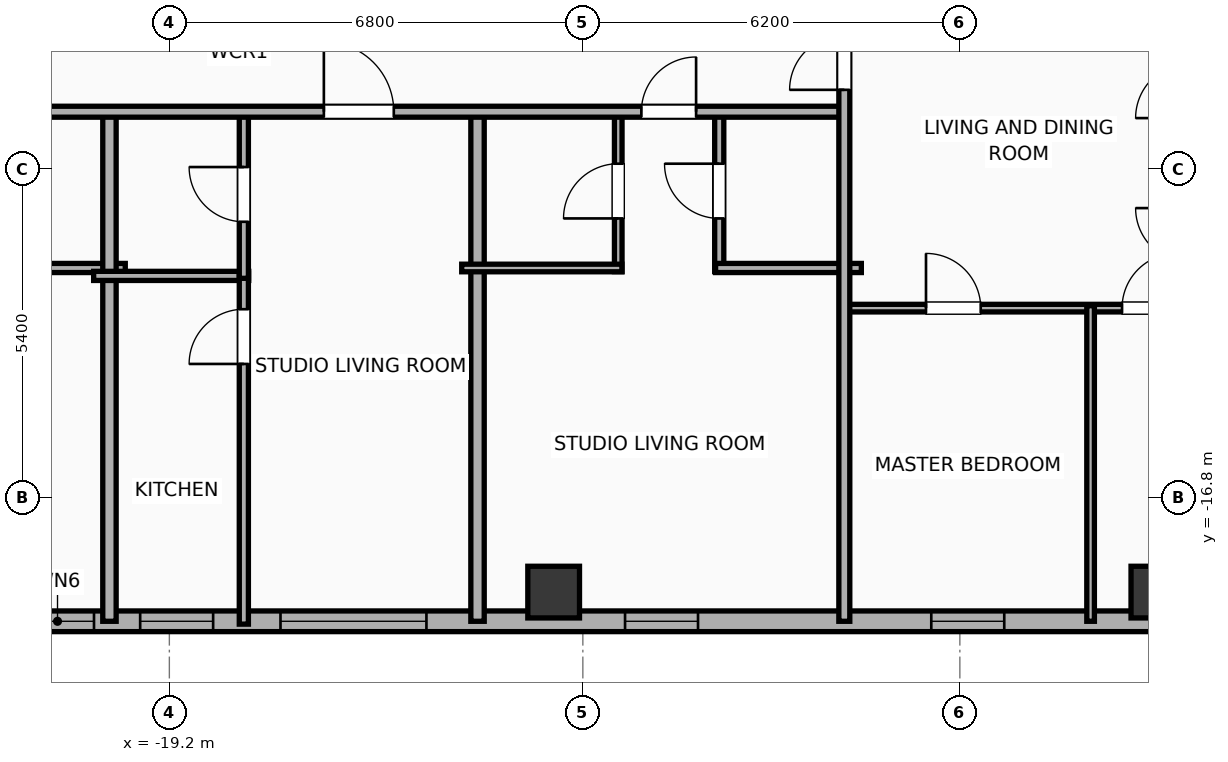
"""IFC4 building model, lengths in metres.
Left out: names, types, materials, properties, quantities, classifications, styles, units other than length and angle.
Written with IfcOpenShell. Run it as: python <this file> out.ifc"""

import sys

from ifc_helpers import new_model, si_unit, direction, frame, frame_2d, origin, origin_2d, place, context, subcontext, project, spatial, rectangle, hollow_rectangle, extrude, element, fill, save


model = new_model("IFC4")
c1 = context("Model", 3, precision=1e-05, world=origin(), true_north=direction((0.0, 1.0)))
c2 = subcontext(c1, "Body", "Model", "MODEL_VIEW")
j1 = project(units=[si_unit("LENGTHUNIT", "METRE"), si_unit("PLANEANGLEUNIT", "RADIAN")], contexts=[c1])
p1 = place(None, origin())
s1 = spatial("IfcSite", under=j1, at=p1, CompositionType="ELEMENT")
p2 = place(p1, origin())
s2 = spatial("IfcBuilding", under=s1, at=p2, CompositionType="ELEMENT")
p3 = place(p2, frame((0.0, 0.0, 239.2)))
s3 = spatial("IfcBuildingStorey", under=s2, at=p3, CompositionType="ELEMENT", Elevation=239.2)
for number, where, z_axis, x_axis in (
    (1, (-12.88, -18.35, 0.0), (0.0, 0.0, 1.0), (1.0, 0.0, 0.0)),
    (2, (-2.96, -18.35, 0.0), (0.0, 0.0, 1.0), (1.0, 0.0, 0.0)),
):
    element("IfcColumn", number, at=place(p3, frame(where, z_axis=z_axis, x_axis=x_axis)), inside=s3, PredefinedType="COLUMN", context=c2, shape_type="SweptSolid", body=[
        extrude(hollow_rectangle(XDim=0.85, YDim=0.85, WallThickness=0.028, at=origin_2d()), origin(), (0.0, 0.0, 1.0), 3.9),
    ])
p4 = place(p3, frame((26.783, -18.83, 0.0), z_axis=(0.0, 0.0, 1.0), x_axis=(-1.0, 0.0, 0.0)))
e3 = element("IfcWall", 3, at=p4, inside=s3, PredefinedType="ELEMENTEDWALL", context=c2, shape_type="SweptSolid", body=[
    extrude(rectangle(XDim=49.566, YDim=0.34, at=frame_2d((24.783, 0.0))), origin(), (0.0, 0.0, 1.0), 3.65),
])
p5 = place(p4, frame((23.583, 0.0, 0.75)))
e4 = element("IfcOpeningElement", 4, at=p5, cuts=e3, PredefinedType="OPENING", context=c2, shape_type="SweptSolid", body=[
    extrude(rectangle(XDim=2.4, YDim=2.1, at=frame_2d((1.2, 1.05))), frame((0.0, 0.18, 0.0), z_axis=(0.0, -1.0, 0.0), x_axis=(1.0, 0.0, 0.0)), (0.0, 0.0, 1.0), 0.36),
])
p6 = place(p4, frame((41.756, 0.0, 0.75)))
e5 = element("IfcOpeningElement", 5, at=p6, cuts=e3, PredefinedType="OPENING", context=c2, shape_type="SweptSolid", body=[
    extrude(rectangle(XDim=2.4, YDim=2.1, at=frame_2d((1.2, 1.05))), frame((0.0, 0.18, 0.0), z_axis=(0.0, -1.0, 0.0), x_axis=(1.0, 0.0, 0.0)), (0.0, 0.0, 1.0), 0.36),
])
p7 = place(p4, frame((47.222, 0.0, 0.75)))
e6 = element("IfcOpeningElement", 6, at=p7, cuts=e3, PredefinedType="OPENING", context=c2, shape_type="SweptSolid", body=[
    extrude(rectangle(XDim=1.2, YDim=2.05, at=frame_2d((0.6, 1.025))), frame((0.0, 0.18, 0.0), z_axis=(0.0, -1.0, 0.0), x_axis=(1.0, 0.0, 0.0)), (0.0, 0.0, 1.0), 0.36),
])
p8 = place(p4, frame((45.263, 0.0, 0.75)))
e7 = element("IfcOpeningElement", 7, at=p8, cuts=e3, PredefinedType="OPENING", context=c2, shape_type="SweptSolid", body=[
    extrude(rectangle(XDim=1.2, YDim=2.05, at=frame_2d((0.6, 1.025))), frame((0.0, 0.18, 0.0), z_axis=(0.0, -1.0, 0.0), x_axis=(1.0, 0.0, 0.0)), (0.0, 0.0, 1.0), 0.36),
])
p9 = place(p4, frame((37.289, 0.0, 0.75)))
e8 = element("IfcOpeningElement", 8, at=p9, cuts=e3, PredefinedType="OPENING", context=c2, shape_type="SweptSolid", body=[
    extrude(rectangle(XDim=1.2, YDim=2.05, at=frame_2d((0.6, 1.025))), frame((0.0, 0.18, 0.0), z_axis=(0.0, -1.0, 0.0), x_axis=(1.0, 0.0, 0.0)), (0.0, 0.0, 1.0), 0.36),
])
p10 = place(p4, frame((16.115, 0.0, 0.75)))
e9 = element("IfcOpeningElement", 9, at=p10, cuts=e3, PredefinedType="OPENING", context=c2, shape_type="SweptSolid", body=[
    extrude(rectangle(XDim=1.2, YDim=2.05, at=frame_2d((0.6, 1.025))), frame((0.0, 0.18, 0.0), z_axis=(0.0, -1.0, 0.0), x_axis=(1.0, 0.0, 0.0)), (0.0, 0.0, 1.0), 0.36),
])
p11 = place(p4, frame((12.422, 0.0, 0.75)))
e10 = element("IfcOpeningElement", 10, at=p11, cuts=e3, PredefinedType="OPENING", context=c2, shape_type="SweptSolid", body=[
    extrude(rectangle(XDim=1.2, YDim=2.05, at=frame_2d((0.6, 1.025))), frame((0.0, 0.18, 0.0), z_axis=(0.0, -1.0, 0.0), x_axis=(1.0, 0.0, 0.0)), (0.0, 0.0, 1.0), 0.36),
])
p12 = place(p4, frame((8.01, 0.0, 0.75)))
e11 = element("IfcOpeningElement", 11, at=p12, cuts=e3, PredefinedType="OPENING", context=c2, shape_type="SweptSolid", body=[
    extrude(rectangle(XDim=1.2, YDim=2.05, at=frame_2d((0.6, 1.025))), frame((0.0, 0.18, 0.0), z_axis=(0.0, -1.0, 0.0), x_axis=(1.0, 0.0, 0.0)), (0.0, 0.0, 1.0), 0.36),
])
p13 = place(p4, frame((5.037, 0.0, 0.75)))
e12 = element("IfcOpeningElement", 12, at=p13, cuts=e3, PredefinedType="OPENING", context=c2, shape_type="SweptSolid", body=[
    extrude(rectangle(XDim=1.2, YDim=2.05, at=frame_2d((0.6, 1.025))), frame((0.0, 0.18, 0.0), z_axis=(0.0, -1.0, 0.0), x_axis=(1.0, 0.0, 0.0)), (0.0, 0.0, 1.0), 0.36),
])
p14 = place(p4, frame((1.811, 0.0, 0.75)))
e13 = element("IfcOpeningElement", 13, at=p14, cuts=e3, PredefinedType="OPENING", context=c2, shape_type="SweptSolid", body=[
    extrude(rectangle(XDim=1.2, YDim=2.05, at=frame_2d((0.6, 1.025))), frame((0.0, 0.18, 0.0), z_axis=(0.0, -1.0, 0.0), x_axis=(1.0, 0.0, 0.0)), (0.0, 0.0, 1.0), 0.36),
])
p15 = place(p4, frame((32.253, 0.0, 0.75)))
e14 = element("IfcOpeningElement", 14, at=p15, cuts=e3, PredefinedType="OPENING", context=c2, shape_type="SweptSolid", body=[
    extrude(rectangle(XDim=1.2, YDim=2.05, at=frame_2d((0.6, 1.025))), frame((0.0, 0.18, 0.0), z_axis=(0.0, -1.0, 0.0), x_axis=(1.0, 0.0, 0.0)), (0.0, 0.0, 1.0), 0.36),
])
p16 = place(p4, frame((27.853, 0.0, 0.75)))
e15 = element("IfcOpeningElement", 15, at=p16, cuts=e3, PredefinedType="OPENING", context=c2, shape_type="SweptSolid", body=[
    extrude(rectangle(XDim=1.2, YDim=2.05, at=frame_2d((0.6, 1.025))), frame((0.0, 0.18, 0.0), z_axis=(0.0, -1.0, 0.0), x_axis=(1.0, 0.0, 0.0)), (0.0, 0.0, 1.0), 0.36),
])
p17 = place(p4, frame((20.473, 0.0, 0.75)))
e16 = element("IfcOpeningElement", 16, at=p17, cuts=e3, PredefinedType="OPENING", context=c2, shape_type="SweptSolid", body=[
    extrude(rectangle(XDim=1.2, YDim=2.05, at=frame_2d((0.6, 1.025))), frame((0.0, 0.18, 0.0), z_axis=(0.0, -1.0, 0.0), x_axis=(1.0, 0.0, 0.0)), (0.0, 0.0, 1.0), 0.36),
])
p18 = place(p3, frame((-22.342, -13.02, 0.0), z_axis=(0.0, 0.0, 1.0), x_axis=(1.0, 0.0, 0.0)))
e17 = element("IfcWall", 17, at=p18, inside=s3, PredefinedType="PLUMBINGWALL", context=c2, shape_type="SweptSolid", body=[
    extrude(rectangle(XDim=2.417, YDim=0.15, at=frame_2d((1.208, 0.0))), origin(), (0.0, 0.0, 1.0), 3.65),
])
p19 = place(p3, frame((-20.185, -18.83, 0.0), z_axis=(0.0, 0.0, 1.0), x_axis=(0.0, 1.0, 0.0)))
e18 = element("IfcWall", 18, at=p19, inside=s3, PredefinedType="PARTITIONING", context=c2, shape_type="SweptSolid", body=[
    extrude(rectangle(XDim=8.46, YDim=0.22, at=frame_2d((4.23, 0.0))), origin(), (0.0, 0.0, 1.0), 3.09),
])
p20 = place(p3, frame((-20.445, -13.15, 0.0), z_axis=(0.0, 0.0, 1.0), x_axis=(1.0, 0.0, 0.0)))
e19 = element("IfcWall", 19, at=p20, inside=s3, PredefinedType="PLUMBINGWALL", context=c2, shape_type="SweptSolid", body=[
    extrude(rectangle(XDim=2.55, YDim=0.15, at=frame_2d((1.275, 0.0))), origin(), (0.0, 0.0, 1.0), 3.65),
])
p21 = place(p3, frame((-17.975, -18.877, 0.0), z_axis=(0.0, 0.0, 1.0), x_axis=(0.0, 1.0, 0.0)))
e20 = element("IfcWall", 20, at=p21, inside=s3, PredefinedType="PLUMBINGWALL", context=c2, shape_type="SweptSolid", body=[
    extrude(rectangle(XDim=5.767, YDim=0.15, at=frame_2d((2.883, 0.0))), origin(), (0.0, 0.0, 1.0), 3.65),
])
p22 = place(p21, frame((4.279, 0.0, 0.0)))
e21 = element("IfcOpeningElement", 21, at=p22, cuts=e20, PredefinedType="OPENING", context=c2, shape_type="SweptSolid", body=[
    extrude(rectangle(XDim=0.9, YDim=2.05, at=frame_2d((0.45, 1.025))), frame((0.0, 0.085, 0.0), z_axis=(0.0, -1.0, 0.0), x_axis=(1.0, 0.0, 0.0)), (0.0, 0.0, 1.0), 0.17),
])
p23 = place(p3, frame((-17.975, -13.19, 0.0), z_axis=(0.0, 0.0, 1.0), x_axis=(0.0, 1.0, 0.0)))
e22 = element("IfcWall", 22, at=p23, inside=s3, PredefinedType="PLUMBINGWALL", context=c2, shape_type="SweptSolid", body=[
    extrude(rectangle(XDim=2.76, YDim=0.15, at=frame_2d((1.38, 0.0))), origin(), (0.0, 0.0, 1.0), 3.65),
])
p24 = place(p23, frame((0.93, 0.0, 0.0)))
e23 = element("IfcOpeningElement", 23, at=p24, cuts=e22, PredefinedType="OPENING", context=c2, shape_type="SweptSolid", body=[
    extrude(rectangle(XDim=0.9, YDim=2.05, at=frame_2d((0.45, 1.025))), frame((0.0, 0.085, 0.0), z_axis=(0.0, -1.0, 0.0), x_axis=(1.0, 0.0, 0.0)), (0.0, 0.0, 1.0), 0.17),
])
p25 = place(p3, frame((-14.132, -18.83, 0.0), z_axis=(0.0, 0.0, 1.0), x_axis=(0.0, 1.0, 0.0)))
e24 = element("IfcWall", 24, at=p25, inside=s3, PredefinedType="PARTITIONING", context=c2, shape_type="SweptSolid", body=[
    extrude(rectangle(XDim=8.46, YDim=0.22, at=frame_2d((4.23, 0.0))), origin(), (0.0, 0.0, 1.0), 3.65),
])
p26 = place(p3, frame((-11.818, -13.08, 0.0), z_axis=(0.0, 0.0, 1.0), x_axis=(0.0, 1.0, 0.0)))
e25 = element("IfcWall", 25, at=p26, inside=s3, PredefinedType="PARTITIONING", context=c2, shape_type="SweptSolid", body=[
    extrude(rectangle(XDim=2.65, YDim=0.125, at=frame_2d((1.325, 0.0))), origin(), (0.0, 0.0, 1.0), 3.65),
])
p27 = place(p26, frame((0.875, 0.0, 0.0)))
e26 = element("IfcOpeningElement", 26, at=p27, cuts=e25, PredefinedType="OPENING", context=c2, shape_type="SweptSolid", body=[
    extrude(rectangle(XDim=0.9, YDim=2.05, at=frame_2d((0.45, 1.025))), frame((0.0, 0.073, 0.0), z_axis=(0.0, -1.0, 0.0), x_axis=(1.0, 0.0, 0.0)), (0.0, 0.0, 1.0), 0.145),
])
p28 = place(p3, frame((-10.157, -13.08, 0.0), z_axis=(0.0, 0.0, 1.0), x_axis=(0.0, 1.0, 0.0)))
e27 = element("IfcWall", 27, at=p28, inside=s3, PredefinedType="PLUMBINGWALL", context=c2, shape_type="SweptSolid", body=[
    extrude(rectangle(XDim=2.65, YDim=0.15, at=frame_2d((1.325, 0.0))), origin(), (0.0, 0.0, 1.0), 3.65),
])
p29 = place(p28, frame((0.875, 0.0, 0.0)))
e28 = element("IfcOpeningElement", 28, at=p29, cuts=e27, PredefinedType="OPENING", context=c2, shape_type="SweptSolid", body=[
    extrude(rectangle(XDim=0.9, YDim=2.05, at=frame_2d((0.45, 1.025))), frame((0.0, 0.085, 0.0), z_axis=(0.0, -1.0, 0.0), x_axis=(1.0, 0.0, 0.0)), (0.0, 0.0, 1.0), 0.17),
])
p30 = place(p3, frame((-14.392, -13.02, 0.0), z_axis=(0.0, 0.0, 1.0), x_axis=(1.0, 0.0, 0.0)))
e29 = element("IfcWall", 29, at=p30, inside=s3, PredefinedType="PARTITIONING", context=c2, shape_type="SweptSolid", body=[
    extrude(rectangle(XDim=2.634, YDim=0.125, at=frame_2d((1.317, 0.0))), origin(), (0.0, 0.0, 1.0), 3.65),
])
p31 = place(p3, frame((-10.217, -13.02, 0.0), z_axis=(0.0, 0.0, 1.0), x_axis=(1.0, 0.0, 0.0)))
e30 = element("IfcWall", 30, at=p31, inside=s3, PredefinedType="PLUMBINGWALL", context=c2, shape_type="SweptSolid", body=[
    extrude(rectangle(XDim=2.397, YDim=0.15, at=frame_2d((1.198, 0.0))), origin(), (0.0, 0.0, 1.0), 3.65),
])
p32 = place(p3, frame((-26.23, -10.45, 0.0), z_axis=(0.0, 0.0, 1.0), x_axis=(1.0, 0.0, 0.0)))
e31 = element("IfcWall", 31, at=p32, inside=s3, PredefinedType="PARTITIONING", context=c2, shape_type="SweptSolid", body=[
    extrude(rectangle(XDim=18.15, YDim=0.18, at=frame_2d((9.075, 0.0))), origin(), (0.0, 0.0, 1.0), 3.65),
])
p33 = place(p32, frame((2.659, 0.0, 0.0)))
e32 = element("IfcOpeningElement", 32, at=p33, cuts=e31, PredefinedType="OPENING", context=c2, shape_type="SweptSolid", body=[
    extrude(rectangle(XDim=0.9, YDim=2.05, at=frame_2d((0.45, 1.025))), frame((0.0, 0.1, 0.0), z_axis=(0.0, -1.0, 0.0), x_axis=(1.0, 0.0, 0.0)), (0.0, 0.0, 1.0), 0.2),
])
p34 = place(p32, frame((9.571, 0.0, 0.0)))
e33 = element("IfcOpeningElement", 33, at=p34, cuts=e31, PredefinedType="OPENING", context=c2, shape_type="SweptSolid", body=[
    extrude(rectangle(XDim=1.15, YDim=2.05, at=frame_2d((0.575, 1.025))), frame((0.0, 0.1, 0.0), z_axis=(0.0, -1.0, 0.0), x_axis=(1.0, 0.0, 0.0)), (0.0, 0.0, 1.0), 0.2),
])
p35 = place(p32, frame((14.792, 0.0, 0.0)))
e34 = element("IfcOpeningElement", 34, at=p35, cuts=e31, PredefinedType="OPENING", context=c2, shape_type="SweptSolid", body=[
    extrude(rectangle(XDim=0.9, YDim=2.05, at=frame_2d((0.45, 1.025))), frame((0.0, 0.1, 0.0), z_axis=(0.0, -1.0, 0.0), x_axis=(1.0, 0.0, 0.0)), (0.0, 0.0, 1.0), 0.2),
])
p36 = place(p3, frame((-8.08, -13.68, 0.0), z_axis=(0.0, 0.0, 1.0), x_axis=(1.0, 0.0, 0.0)))
e35 = element("IfcWall", 35, at=p36, inside=s3, PredefinedType="PARTITIONING", context=c2, shape_type="SweptSolid", body=[
    extrude(rectangle(XDim=8.06, YDim=0.125, at=frame_2d((4.03, 0.0))), origin(), (0.0, 0.0, 1.0), 3.65),
])
p37 = place(p36, frame((1.323, 0.0, 0.0)))
e36 = element("IfcOpeningElement", 36, at=p37, cuts=e35, PredefinedType="OPENING", context=c2, shape_type="SweptSolid", body=[
    extrude(rectangle(XDim=0.9, YDim=2.05, at=frame_2d((0.45, 1.025))), frame((0.0, 0.073, 0.0), z_axis=(0.0, -1.0, 0.0), x_axis=(1.0, 0.0, 0.0)), (0.0, 0.0, 1.0), 0.145),
])
p38 = place(p36, frame((4.547, 0.0, 0.0)))
e37 = element("IfcOpeningElement", 37, at=p38, cuts=e35, PredefinedType="OPENING", context=c2, shape_type="SweptSolid", body=[
    extrude(rectangle(XDim=0.9, YDim=2.05, at=frame_2d((0.45, 1.025))), frame((0.0, 0.073, 0.0), z_axis=(0.0, -1.0, 0.0), x_axis=(1.0, 0.0, 0.0)), (0.0, 0.0, 1.0), 0.145),
])
p39 = place(p3, frame((-4.05, -18.83, 0.0), z_axis=(0.0, 0.0, 1.0), x_axis=(0.0, 1.0, 0.0)))
e38 = element("IfcWall", 38, at=p39, inside=s3, PredefinedType="PARTITIONING", context=c2, shape_type="SweptSolid", body=[
    extrude(rectangle(XDim=5.19, YDim=0.125, at=frame_2d((2.595, 0.0))), origin(), (0.0, 0.0, 1.0), 3.65),
])
p40 = place(p3, frame((-8.1, -18.83, 0.0), z_axis=(0.0, 0.0, 1.0), x_axis=(0.0, 1.0, 0.0)))
e39 = element("IfcWall", 39, at=p40, inside=s3, PredefinedType="PARTITIONING", context=c2, shape_type="SweptSolid", body=[
    extrude(rectangle(XDim=9.99, YDim=0.18, at=frame_2d((4.995, 0.0))), origin(), (0.0, 0.0, 1.0), 3.65),
])
p41 = place(p40, frame((8.74, 0.0, 0.0)))
e40 = element("IfcOpeningElement", 40, at=p41, cuts=e39, PredefinedType="OPENING", context=c2, shape_type="SweptSolid", body=[
    extrude(rectangle(XDim=0.9, YDim=2.05, at=frame_2d((0.45, 1.025))), frame((0.0, 0.1, 0.0), z_axis=(0.0, -1.0, 0.0), x_axis=(1.0, 0.0, 0.0)), (0.0, 0.0, 1.0), 0.2),
])
p42 = place(p6, origin())
e41 = element("IfcWindow", 41, at=p42, inside=s3, PartitioningType="SINGLE_PANEL", PredefinedType="WINDOW", context=c2, shape_type="SweptSolid", body=[
    extrude(rectangle(XDim=2.4, YDim=2.1, at=frame_2d((1.2, 1.05))), frame((0.0, 0.03, 0.0), z_axis=(0.0, -1.0, 0.0), x_axis=(1.0, 0.0, 0.0)), (0.0, 0.0, 1.0), 0.06),
])
fill(e5, e41)
p43 = place(p7, origin())
e42 = element("IfcWindow", 42, at=p43, inside=s3, PartitioningType="SINGLE_PANEL", PredefinedType="WINDOW", context=c2, shape_type="SweptSolid", body=[
    extrude(rectangle(XDim=1.2, YDim=2.05, at=frame_2d((0.6, 1.025))), frame((0.0, 0.03, 0.0), z_axis=(0.0, -1.0, 0.0), x_axis=(1.0, 0.0, 0.0)), (0.0, 0.0, 1.0), 0.06),
])
fill(e6, e42)
p44 = place(p8, origin())
e43 = element("IfcWindow", 43, at=p44, inside=s3, PartitioningType="SINGLE_PANEL", PredefinedType="WINDOW", context=c2, shape_type="SweptSolid", body=[
    extrude(rectangle(XDim=1.2, YDim=2.05, at=frame_2d((0.6, 1.025))), frame((0.0, 0.03, 0.0), z_axis=(0.0, -1.0, 0.0), x_axis=(1.0, 0.0, 0.0)), (0.0, 0.0, 1.0), 0.06),
])
fill(e7, e43)
p45 = place(p9, origin())
e44 = element("IfcWindow", 44, at=p45, inside=s3, PartitioningType="SINGLE_PANEL", PredefinedType="WINDOW", context=c2, shape_type="SweptSolid", body=[
    extrude(rectangle(XDim=1.2, YDim=2.05, at=frame_2d((0.6, 1.025))), frame((0.0, 0.03, 0.0), z_axis=(0.0, -1.0, 0.0), x_axis=(1.0, 0.0, 0.0)), (0.0, 0.0, 1.0), 0.06),
])
fill(e8, e44)
p46 = place(p15, origin())
e45 = element("IfcWindow", 45, at=p46, inside=s3, PartitioningType="SINGLE_PANEL", PredefinedType="WINDOW", context=c2, shape_type="SweptSolid", body=[
    extrude(rectangle(XDim=1.2, YDim=2.05, at=frame_2d((0.6, 1.025))), frame((0.0, 0.03, 0.0), z_axis=(0.0, -1.0, 0.0), x_axis=(1.0, 0.0, 0.0)), (0.0, 0.0, 1.0), 0.06),
])
fill(e14, e45)
p47 = place(p22, origin())
e46 = element("IfcDoor", 46, at=p47, inside=s3, OperationType="SINGLE_SWING_LEFT", PredefinedType="DOOR", context=c2, shape_type="SweptSolid", body=[
    extrude(rectangle(XDim=0.9, YDim=2.05, at=frame_2d((0.45, 1.025))), frame((0.0, 0.025, 0.0), z_axis=(0.0, -1.0, 0.0), x_axis=(1.0, 0.0, 0.0)), (0.0, 0.0, 1.0), 0.05),
])
fill(e21, e46)
p48 = place(p24, origin())
e47 = element("IfcDoor", 47, at=p48, inside=s3, OperationType="SINGLE_SWING_RIGHT", PredefinedType="DOOR", context=c2, shape_type="SweptSolid", body=[
    extrude(rectangle(XDim=0.9, YDim=2.05, at=frame_2d((0.45, 1.025))), frame((0.0, 0.025, 0.0), z_axis=(0.0, -1.0, 0.0), x_axis=(1.0, 0.0, 0.0)), (0.0, 0.0, 1.0), 0.05),
])
fill(e23, e47)
p49 = place(p27, origin())
e48 = element("IfcDoor", 48, at=p49, inside=s3, OperationType="SINGLE_SWING_LEFT", PredefinedType="DOOR", context=c2, shape_type="SweptSolid", body=[
    extrude(rectangle(XDim=0.9, YDim=2.05, at=frame_2d((0.45, 1.025))), frame((0.0, 0.025, 0.0), z_axis=(0.0, -1.0, 0.0), x_axis=(1.0, 0.0, 0.0)), (0.0, 0.0, 1.0), 0.05),
])
fill(e26, e48)
p50 = place(p29, origin())
e49 = element("IfcDoor", 49, at=p50, inside=s3, OperationType="SINGLE_SWING_RIGHT", PredefinedType="DOOR", context=c2, shape_type="SweptSolid", body=[
    extrude(rectangle(XDim=0.9, YDim=2.05, at=frame_2d((0.45, 1.025))), frame((0.0, 0.025, 0.0), z_axis=(0.0, -1.0, 0.0), x_axis=(1.0, 0.0, 0.0)), (0.0, 0.0, 1.0), 0.05),
])
fill(e28, e49)
p51 = place(p34, origin())
e50 = element("IfcDoor", 50, at=p51, inside=s3, OperationType="SINGLE_SWING_LEFT", PredefinedType="DOOR", context=c2, shape_type="SweptSolid", body=[
    extrude(rectangle(XDim=1.15, YDim=2.05, at=frame_2d((0.575, 1.025))), frame((0.0, 0.025, 0.0), z_axis=(0.0, -1.0, 0.0), x_axis=(1.0, 0.0, 0.0)), (0.0, 0.0, 1.0), 0.05),
])
fill(e33, e50)
p52 = place(p35, origin())
e51 = element("IfcDoor", 51, at=p52, inside=s3, OperationType="SINGLE_SWING_RIGHT", PredefinedType="DOOR", context=c2, shape_type="SweptSolid", body=[
    extrude(rectangle(XDim=0.9, YDim=2.05, at=frame_2d((0.45, 1.025))), frame((0.0, 0.025, 0.0), z_axis=(0.0, -1.0, 0.0), x_axis=(1.0, 0.0, 0.0)), (0.0, 0.0, 1.0), 0.05),
])
fill(e34, e51)
p53 = place(p37, origin())
e52 = element("IfcDoor", 52, at=p53, inside=s3, OperationType="SINGLE_SWING_LEFT", PredefinedType="DOOR", context=c2, shape_type="SweptSolid", body=[
    extrude(rectangle(XDim=0.9, YDim=2.05, at=frame_2d((0.45, 1.025))), frame((0.0, 0.025, 0.0), z_axis=(0.0, -1.0, 0.0), x_axis=(1.0, 0.0, 0.0)), (0.0, 0.0, 1.0), 0.05),
])
fill(e36, e52)
p54 = place(p38, origin())
e53 = element("IfcDoor", 53, at=p54, inside=s3, OperationType="SINGLE_SWING_RIGHT", PredefinedType="DOOR", context=c2, shape_type="SweptSolid", body=[
    extrude(rectangle(XDim=0.9, YDim=2.05, at=frame_2d((0.45, 1.025))), frame((0.0, 0.025, 0.0), z_axis=(0.0, -1.0, 0.0), x_axis=(1.0, 0.0, 0.0)), (0.0, 0.0, 1.0), 0.05),
])
fill(e37, e53)
p55 = place(p41, origin())
e54 = element("IfcDoor", 54, at=p55, inside=s3, OperationType="SINGLE_SWING_LEFT", PredefinedType="DOOR", context=c2, shape_type="SweptSolid", body=[
    extrude(rectangle(XDim=0.9, YDim=2.05, at=frame_2d((0.45, 1.025))), frame((0.0, 0.025, 0.0), z_axis=(0.0, -1.0, 0.0), x_axis=(1.0, 0.0, 0.0)), (0.0, 0.0, 1.0), 0.05),
])
fill(e40, e54)
save(model, sys.argv[1])
